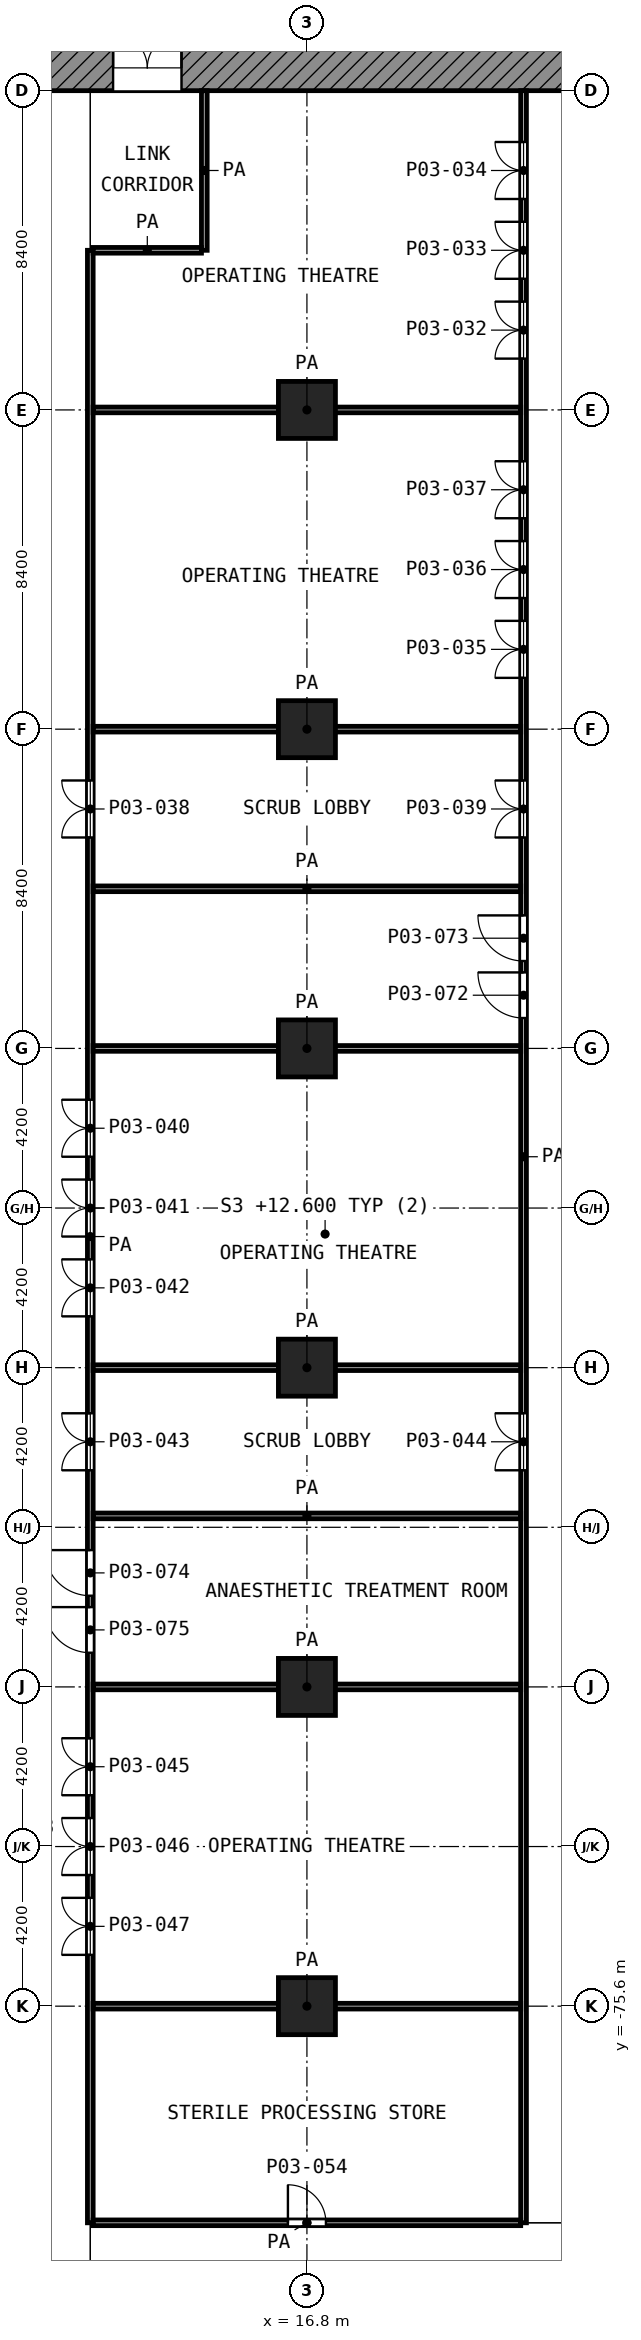
"""IFC4 building model, lengths in metres.
Left out: names, types, materials, properties, quantities, classifications, styles, units other than length and angle.
Written with IfcOpenShell. Run it as: python <this file> out.ifc"""

import sys

from ifc_helpers import new_model, si_unit, direction, frame, frame_2d, origin, origin_2d, place, context, subcontext, project, spatial, rectangle, extrude, element, fill, save


model = new_model("IFC4")
c1 = context("Model", 3, precision=1e-05, world=origin(), true_north=direction((0.0, 1.0)))
c2 = subcontext(c1, "Body", "Model", "MODEL_VIEW")
j1 = project(units=[si_unit("LENGTHUNIT", "METRE"), si_unit("PLANEANGLEUNIT", "RADIAN")], contexts=[c1])
p1 = place(None, origin())
s1 = spatial("IfcSite", under=j1, at=p1, CompositionType="ELEMENT")
p2 = place(p1, origin())
s2 = spatial("IfcBuilding", under=s1, at=p2, CompositionType="ELEMENT")
p3 = place(p2, frame((0.0, 0.0, 12.6)))
s3 = spatial("IfcBuildingStorey", under=s2, at=p3, CompositionType="ELEMENT", Elevation=12.6)
for number, where, z_axis, x_axis in (
    (1, (16.8, -33.6, 0.0), (0.0, 0.0, 1.0), (1.0, 0.0, 0.0)),
    (2, (16.8, -42.0, 0.0), (0.0, 0.0, 1.0), (1.0, 0.0, 0.0)),
    (3, (16.8, -50.4, 0.0), (0.0, 0.0, 1.0), (1.0, 0.0, 0.0)),
    (4, (16.8, -58.8, 0.0), (0.0, 0.0, 1.0), (1.0, 0.0, 0.0)),
    (5, (16.8, -67.2, 0.0), (0.0, 0.0, 1.0), (1.0, 0.0, 0.0)),
    (6, (16.8, -75.6, 0.0), (0.0, 0.0, 1.0), (1.0, 0.0, 0.0)),
):
    element("IfcColumn", number, at=place(p3, frame(where, z_axis=z_axis, x_axis=x_axis)), inside=s3, PredefinedType="COLUMN", context=c2, shape_type="SweptSolid", body=[
        extrude(rectangle(XDim=1.5, YDim=1.5, at=origin_2d()), origin(), (0.0, 0.0, 1.0), 5.6),
    ])
p4 = place(p3, frame((5.4, -24.6, 0.0), z_axis=(0.0, 0.0, 1.0), x_axis=(1.0, 0.0, 0.0)))
e7 = element("IfcWall", 7, at=p4, inside=s3, PredefinedType="SHEAR", context=c2, shape_type="SweptSolid", body=[
    extrude(rectangle(XDim=18.6, YDim=1.2, at=frame_2d((9.3, 0.0))), origin(), (0.0, 0.0, 1.0), 5.25),
])
p5 = place(p4, frame((6.3, 0.0, 0.0)))
e8 = element("IfcOpeningElement", 8, at=p5, cuts=e7, PredefinedType="OPENING", context=c2, shape_type="SweptSolid", body=[
    extrude(rectangle(XDim=1.8, YDim=2.1, at=frame_2d((0.9, 1.05))), frame((0.0, 0.61, 0.0), z_axis=(0.0, -1.0, 0.0), x_axis=(1.0, 0.0, 0.0)), (0.0, 0.0, 1.0), 1.22),
])
p6 = place(p3, frame((11.175, -81.3, 0.0), z_axis=(0.0, 0.0, 1.0), x_axis=(1.0, 0.0, 0.0)))
e9 = element("IfcWall", 9, at=p6, inside=s3, PredefinedType="PARTITIONING", context=c2, shape_type="SweptSolid", body=[
    extrude(rectangle(XDim=11.25, YDim=0.15, at=frame_2d((5.625, 0.0))), origin(), (0.0, 0.0, 1.0), 5.25),
])
p7 = place(p6, frame((5.125, 0.0, 0.0)))
e10 = element("IfcOpeningElement", 10, at=p7, cuts=e9, PredefinedType="OPENING", context=c2, shape_type="SweptSolid", body=[
    extrude(rectangle(XDim=1.0, YDim=2.1, at=frame_2d((0.5, 1.05))), frame((0.0, 0.085, 0.0), z_axis=(0.0, -1.0, 0.0), x_axis=(1.0, 0.0, 0.0)), (0.0, 0.0, 1.0), 0.17),
])
for number, where, z_axis, x_axis in (
    (11, (11.175, -75.6, 0.0), (0.0, 0.0, 1.0), (1.0, 0.0, 0.0)),
    (12, (11.175, -67.2, 0.0), (0.0, 0.0, 1.0), (1.0, 0.0, 0.0)),
    (13, (11.175, -62.7, 0.0), (0.0, 0.0, 1.0), (1.0, 0.0, 0.0)),
    (14, (11.175, -58.8, 0.0), (0.0, 0.0, 1.0), (1.0, 0.0, 0.0)),
    (15, (11.175, -50.4, 0.0), (0.0, 0.0, 1.0), (1.0, 0.0, 0.0)),
    (16, (11.175, -46.2, 0.0), (0.0, 0.0, 1.0), (1.0, 0.0, 0.0)),
    (17, (11.175, -42.0, 0.0), (0.0, 0.0, 1.0), (1.0, 0.0, 0.0)),
    (18, (11.175, -33.6, 0.0), (0.0, 0.0, 1.0), (1.0, 0.0, 0.0)),
):
    element("IfcWall", number, at=place(p3, frame(where, z_axis=z_axis, x_axis=x_axis)), inside=s3, PredefinedType="PARTITIONING", context=c2, shape_type="SweptSolid", body=[
        extrude(rectangle(XDim=11.25, YDim=0.15, at=frame_2d((5.625, 0.0))), origin(), (0.0, 0.0, 1.0), 5.25),
    ])
p8 = place(p3, frame((11.175, -29.4, 0.0), z_axis=(0.0, 0.0, 1.0), x_axis=(1.0, 0.0, 0.0)))
e19 = element("IfcWall", 19, at=p8, inside=s3, PredefinedType="PARTITIONING", context=c2, shape_type="SweptSolid", body=[
    extrude(rectangle(XDim=2.85, YDim=0.15, at=frame_2d((1.425, 0.0))), origin(), (0.0, 0.0, 1.0), 5.25),
])
p9 = place(p3, frame((11.1, -81.3, 0.0), z_axis=(0.0, 0.0, 1.0), x_axis=(0.0, 1.0, 0.0)))
e20 = element("IfcWall", 20, at=p9, inside=s3, PredefinedType="PARTITIONING", context=c2, shape_type="SweptSolid", body=[
    extrude(rectangle(XDim=51.9, YDim=0.15, at=frame_2d((25.95, 0.0))), origin(), (0.0, 0.0, 1.0), 5.25),
])
p10 = place(p9, frame((36.45, 0.0, 0.0)))
e21 = element("IfcOpeningElement", 21, at=p10, cuts=e20, PredefinedType="OPENING", context=c2, shape_type="SweptSolid", body=[
    extrude(rectangle(XDim=1.5, YDim=2.1, at=frame_2d((0.75, 1.05))), frame((0.0, 0.085, 0.0), z_axis=(0.0, -1.0, 0.0), x_axis=(1.0, 0.0, 0.0)), (0.0, 0.0, 1.0), 0.17),
])
p11 = place(p9, frame((28.05, 0.0, 0.0)))
e22 = element("IfcOpeningElement", 22, at=p11, cuts=e20, PredefinedType="OPENING", context=c2, shape_type="SweptSolid", body=[
    extrude(rectangle(XDim=1.5, YDim=2.1, at=frame_2d((0.75, 1.05))), frame((0.0, 0.085, 0.0), z_axis=(0.0, -1.0, 0.0), x_axis=(1.0, 0.0, 0.0)), (0.0, 0.0, 1.0), 0.17),
])
p12 = place(p9, frame((25.95, 0.0, 0.0)))
e23 = element("IfcOpeningElement", 23, at=p12, cuts=e20, PredefinedType="OPENING", context=c2, shape_type="SweptSolid", body=[
    extrude(rectangle(XDim=1.5, YDim=2.1, at=frame_2d((0.75, 1.05))), frame((0.0, 0.085, 0.0), z_axis=(0.0, -1.0, 0.0), x_axis=(1.0, 0.0, 0.0)), (0.0, 0.0, 1.0), 0.17),
])
p13 = place(p9, frame((23.85, 0.0, 0.0)))
e24 = element("IfcOpeningElement", 24, at=p13, cuts=e20, PredefinedType="OPENING", context=c2, shape_type="SweptSolid", body=[
    extrude(rectangle(XDim=1.5, YDim=2.1, at=frame_2d((0.75, 1.05))), frame((0.0, 0.085, 0.0), z_axis=(0.0, -1.0, 0.0), x_axis=(1.0, 0.0, 0.0)), (0.0, 0.0, 1.0), 0.17),
])
p14 = place(p9, frame((19.8, 0.0, 0.0)))
e25 = element("IfcOpeningElement", 25, at=p14, cuts=e20, PredefinedType="OPENING", context=c2, shape_type="SweptSolid", body=[
    extrude(rectangle(XDim=1.5, YDim=2.1, at=frame_2d((0.75, 1.05))), frame((0.0, 0.085, 0.0), z_axis=(0.0, -1.0, 0.0), x_axis=(1.0, 0.0, 0.0)), (0.0, 0.0, 1.0), 0.17),
])
p15 = place(p9, frame((16.5, 0.0, 0.0)))
e26 = element("IfcOpeningElement", 26, at=p15, cuts=e20, PredefinedType="OPENING", context=c2, shape_type="SweptSolid", body=[
    extrude(rectangle(XDim=1.2, YDim=2.1, at=frame_2d((0.6, 1.05))), frame((0.0, 0.085, 0.0), z_axis=(0.0, -1.0, 0.0), x_axis=(1.0, 0.0, 0.0)), (0.0, 0.0, 1.0), 0.17),
])
p16 = place(p9, frame((15.0, 0.0, 0.0)))
e27 = element("IfcOpeningElement", 27, at=p16, cuts=e20, PredefinedType="OPENING", context=c2, shape_type="SweptSolid", body=[
    extrude(rectangle(XDim=1.2, YDim=2.1, at=frame_2d((0.6, 1.05))), frame((0.0, 0.085, 0.0), z_axis=(0.0, -1.0, 0.0), x_axis=(1.0, 0.0, 0.0)), (0.0, 0.0, 1.0), 0.17),
])
p17 = place(p9, frame((11.25, 0.0, 0.0)))
e28 = element("IfcOpeningElement", 28, at=p17, cuts=e20, PredefinedType="OPENING", context=c2, shape_type="SweptSolid", body=[
    extrude(rectangle(XDim=1.5, YDim=2.1, at=frame_2d((0.75, 1.05))), frame((0.0, 0.085, 0.0), z_axis=(0.0, -1.0, 0.0), x_axis=(1.0, 0.0, 0.0)), (0.0, 0.0, 1.0), 0.17),
])
p18 = place(p9, frame((9.15, 0.0, 0.0)))
e29 = element("IfcOpeningElement", 29, at=p18, cuts=e20, PredefinedType="OPENING", context=c2, shape_type="SweptSolid", body=[
    extrude(rectangle(XDim=1.5, YDim=2.1, at=frame_2d((0.75, 1.05))), frame((0.0, 0.085, 0.0), z_axis=(0.0, -1.0, 0.0), x_axis=(1.0, 0.0, 0.0)), (0.0, 0.0, 1.0), 0.17),
])
p19 = place(p9, frame((7.05, 0.0, 0.0)))
e30 = element("IfcOpeningElement", 30, at=p19, cuts=e20, PredefinedType="OPENING", context=c2, shape_type="SweptSolid", body=[
    extrude(rectangle(XDim=1.5, YDim=2.1, at=frame_2d((0.75, 1.05))), frame((0.0, 0.085, 0.0), z_axis=(0.0, -1.0, 0.0), x_axis=(1.0, 0.0, 0.0)), (0.0, 0.0, 1.0), 0.17),
])
p20 = place(p3, frame((14.1, -29.4, 0.0), z_axis=(0.0, 0.0, 1.0), x_axis=(0.0, 1.0, 0.0)))
e31 = element("IfcWall", 31, at=p20, inside=s3, PredefinedType="PARTITIONING", context=c2, shape_type="SweptSolid", body=[
    extrude(rectangle(XDim=4.2, YDim=0.15, at=frame_2d((2.1, 0.0))), origin(), (0.0, 0.0, 1.0), 5.25),
])
p21 = place(p3, frame((22.5, -81.3, 0.0), z_axis=(0.0, 0.0, 1.0), x_axis=(0.0, 1.0, 0.0)))
e32 = element("IfcWall", 32, at=p21, inside=s3, PredefinedType="PARTITIONING", context=c2, shape_type="SweptSolid", body=[
    extrude(rectangle(XDim=56.1, YDim=0.15, at=frame_2d((28.05, 0.0))), origin(), (0.0, 0.0, 1.0), 5.25),
])
p22 = place(p21, frame((49.05, 0.0, 0.0)))
e33 = element("IfcOpeningElement", 33, at=p22, cuts=e32, PredefinedType="OPENING", context=c2, shape_type="SweptSolid", body=[
    extrude(rectangle(XDim=1.5, YDim=2.1, at=frame_2d((0.75, 1.05))), frame((0.0, 0.085, 0.0), z_axis=(0.0, -1.0, 0.0), x_axis=(1.0, 0.0, 0.0)), (0.0, 0.0, 1.0), 0.17),
])
p23 = place(p21, frame((51.15, 0.0, 0.0)))
e34 = element("IfcOpeningElement", 34, at=p23, cuts=e32, PredefinedType="OPENING", context=c2, shape_type="SweptSolid", body=[
    extrude(rectangle(XDim=1.5, YDim=2.1, at=frame_2d((0.75, 1.05))), frame((0.0, 0.085, 0.0), z_axis=(0.0, -1.0, 0.0), x_axis=(1.0, 0.0, 0.0)), (0.0, 0.0, 1.0), 0.17),
])
p24 = place(p21, frame((53.25, 0.0, 0.0)))
e35 = element("IfcOpeningElement", 35, at=p24, cuts=e32, PredefinedType="OPENING", context=c2, shape_type="SweptSolid", body=[
    extrude(rectangle(XDim=1.5, YDim=2.1, at=frame_2d((0.75, 1.05))), frame((0.0, 0.085, 0.0), z_axis=(0.0, -1.0, 0.0), x_axis=(1.0, 0.0, 0.0)), (0.0, 0.0, 1.0), 0.17),
])
p25 = place(p21, frame((40.65, 0.0, 0.0)))
e36 = element("IfcOpeningElement", 36, at=p25, cuts=e32, PredefinedType="OPENING", context=c2, shape_type="SweptSolid", body=[
    extrude(rectangle(XDim=1.5, YDim=2.1, at=frame_2d((0.75, 1.05))), frame((0.0, 0.085, 0.0), z_axis=(0.0, -1.0, 0.0), x_axis=(1.0, 0.0, 0.0)), (0.0, 0.0, 1.0), 0.17),
])
p26 = place(p21, frame((42.75, 0.0, 0.0)))
e37 = element("IfcOpeningElement", 37, at=p26, cuts=e32, PredefinedType="OPENING", context=c2, shape_type="SweptSolid", body=[
    extrude(rectangle(XDim=1.5, YDim=2.1, at=frame_2d((0.75, 1.05))), frame((0.0, 0.085, 0.0), z_axis=(0.0, -1.0, 0.0), x_axis=(1.0, 0.0, 0.0)), (0.0, 0.0, 1.0), 0.17),
])
p27 = place(p21, frame((44.85, 0.0, 0.0)))
e38 = element("IfcOpeningElement", 38, at=p27, cuts=e32, PredefinedType="OPENING", context=c2, shape_type="SweptSolid", body=[
    extrude(rectangle(XDim=1.5, YDim=2.1, at=frame_2d((0.75, 1.05))), frame((0.0, 0.085, 0.0), z_axis=(0.0, -1.0, 0.0), x_axis=(1.0, 0.0, 0.0)), (0.0, 0.0, 1.0), 0.17),
])
p28 = place(p21, frame((36.45, 0.0, 0.0)))
e39 = element("IfcOpeningElement", 39, at=p28, cuts=e32, PredefinedType="OPENING", context=c2, shape_type="SweptSolid", body=[
    extrude(rectangle(XDim=1.5, YDim=2.1, at=frame_2d((0.75, 1.05))), frame((0.0, 0.085, 0.0), z_axis=(0.0, -1.0, 0.0), x_axis=(1.0, 0.0, 0.0)), (0.0, 0.0, 1.0), 0.17),
])
p29 = place(p21, frame((31.7, 0.0, 0.0)))
e40 = element("IfcOpeningElement", 40, at=p29, cuts=e32, PredefinedType="OPENING", context=c2, shape_type="SweptSolid", body=[
    extrude(rectangle(XDim=1.2, YDim=2.1, at=frame_2d((0.6, 1.05))), frame((0.0, 0.085, 0.0), z_axis=(0.0, -1.0, 0.0), x_axis=(1.0, 0.0, 0.0)), (0.0, 0.0, 1.0), 0.17),
])
p30 = place(p21, frame((33.2, 0.0, 0.0)))
e41 = element("IfcOpeningElement", 41, at=p30, cuts=e32, PredefinedType="OPENING", context=c2, shape_type="SweptSolid", body=[
    extrude(rectangle(XDim=1.2, YDim=2.1, at=frame_2d((0.6, 1.05))), frame((0.0, 0.085, 0.0), z_axis=(0.0, -1.0, 0.0), x_axis=(1.0, 0.0, 0.0)), (0.0, 0.0, 1.0), 0.17),
])
p31 = place(p21, frame((19.8, 0.0, 0.0)))
e42 = element("IfcOpeningElement", 42, at=p31, cuts=e32, PredefinedType="OPENING", context=c2, shape_type="SweptSolid", body=[
    extrude(rectangle(XDim=1.5, YDim=2.1, at=frame_2d((0.75, 1.05))), frame((0.0, 0.085, 0.0), z_axis=(0.0, -1.0, 0.0), x_axis=(1.0, 0.0, 0.0)), (0.0, 0.0, 1.0), 0.17),
])
p32 = place(p5, origin())
e43 = element("IfcDoor", 43, at=p32, inside=s3, OperationType="DOUBLE_DOOR_SINGLE_SWING", PredefinedType="DOOR", context=c2, shape_type="SweptSolid", body=[
    extrude(rectangle(XDim=1.8, YDim=2.1, at=frame_2d((0.9, 1.05))), frame((0.0, 0.025, 0.0), z_axis=(0.0, -1.0, 0.0), x_axis=(1.0, 0.0, 0.0)), (0.0, 0.0, 1.0), 0.05),
])
fill(e8, e43)
p33 = place(p22, origin())
e44 = element("IfcDoor", 44, at=p33, inside=s3, OperationType="DOUBLE_DOOR_SINGLE_SWING", PredefinedType="DOOR", context=c2, shape_type="SweptSolid", body=[
    extrude(rectangle(XDim=1.5, YDim=2.1, at=frame_2d((0.75, 1.05))), frame((0.0, 0.025, 0.0), z_axis=(0.0, -1.0, 0.0), x_axis=(1.0, 0.0, 0.0)), (0.0, 0.0, 1.0), 0.05),
])
fill(e33, e44)
p34 = place(p23, origin())
e45 = element("IfcDoor", 45, at=p34, inside=s3, OperationType="DOUBLE_DOOR_SINGLE_SWING", PredefinedType="DOOR", context=c2, shape_type="SweptSolid", body=[
    extrude(rectangle(XDim=1.5, YDim=2.1, at=frame_2d((0.75, 1.05))), frame((0.0, 0.025, 0.0), z_axis=(0.0, -1.0, 0.0), x_axis=(1.0, 0.0, 0.0)), (0.0, 0.0, 1.0), 0.05),
])
fill(e34, e45)
p35 = place(p24, origin())
e46 = element("IfcDoor", 46, at=p35, inside=s3, OperationType="DOUBLE_DOOR_SINGLE_SWING", PredefinedType="DOOR", context=c2, shape_type="SweptSolid", body=[
    extrude(rectangle(XDim=1.5, YDim=2.1, at=frame_2d((0.75, 1.05))), frame((0.0, 0.025, 0.0), z_axis=(0.0, -1.0, 0.0), x_axis=(1.0, 0.0, 0.0)), (0.0, 0.0, 1.0), 0.05),
])
fill(e35, e46)
p36 = place(p25, origin())
e47 = element("IfcDoor", 47, at=p36, inside=s3, OperationType="DOUBLE_DOOR_SINGLE_SWING", PredefinedType="DOOR", context=c2, shape_type="SweptSolid", body=[
    extrude(rectangle(XDim=1.5, YDim=2.1, at=frame_2d((0.75, 1.05))), frame((0.0, 0.025, 0.0), z_axis=(0.0, -1.0, 0.0), x_axis=(1.0, 0.0, 0.0)), (0.0, 0.0, 1.0), 0.05),
])
fill(e36, e47)
p37 = place(p26, origin())
e48 = element("IfcDoor", 48, at=p37, inside=s3, OperationType="DOUBLE_DOOR_SINGLE_SWING", PredefinedType="DOOR", context=c2, shape_type="SweptSolid", body=[
    extrude(rectangle(XDim=1.5, YDim=2.1, at=frame_2d((0.75, 1.05))), frame((0.0, 0.025, 0.0), z_axis=(0.0, -1.0, 0.0), x_axis=(1.0, 0.0, 0.0)), (0.0, 0.0, 1.0), 0.05),
])
fill(e37, e48)
p38 = place(p27, origin())
e49 = element("IfcDoor", 49, at=p38, inside=s3, OperationType="DOUBLE_DOOR_SINGLE_SWING", PredefinedType="DOOR", context=c2, shape_type="SweptSolid", body=[
    extrude(rectangle(XDim=1.5, YDim=2.1, at=frame_2d((0.75, 1.05))), frame((0.0, 0.025, 0.0), z_axis=(0.0, -1.0, 0.0), x_axis=(1.0, 0.0, 0.0)), (0.0, 0.0, 1.0), 0.05),
])
fill(e38, e49)
p39 = place(p10, origin())
e50 = element("IfcDoor", 50, at=p39, inside=s3, OperationType="DOUBLE_DOOR_SINGLE_SWING", PredefinedType="DOOR", context=c2, shape_type="SweptSolid", body=[
    extrude(rectangle(XDim=1.5, YDim=2.1, at=frame_2d((0.75, 1.05))), frame((0.0, 0.025, 0.0), z_axis=(0.0, -1.0, 0.0), x_axis=(1.0, 0.0, 0.0)), (0.0, 0.0, 1.0), 0.05),
])
fill(e21, e50)
p40 = place(p28, origin())
e51 = element("IfcDoor", 51, at=p40, inside=s3, OperationType="DOUBLE_DOOR_SINGLE_SWING", PredefinedType="DOOR", context=c2, shape_type="SweptSolid", body=[
    extrude(rectangle(XDim=1.5, YDim=2.1, at=frame_2d((0.75, 1.05))), frame((0.0, 0.025, 0.0), z_axis=(0.0, -1.0, 0.0), x_axis=(1.0, 0.0, 0.0)), (0.0, 0.0, 1.0), 0.05),
])
fill(e39, e51)
p41 = place(p29, origin())
e52 = element("IfcDoor", 52, at=p41, inside=s3, OperationType="SINGLE_SWING_RIGHT", PredefinedType="DOOR", context=c2, shape_type="SweptSolid", body=[
    extrude(rectangle(XDim=1.2, YDim=2.1, at=frame_2d((0.6, 1.05))), frame((0.0, 0.025, 0.0), z_axis=(0.0, -1.0, 0.0), x_axis=(1.0, 0.0, 0.0)), (0.0, 0.0, 1.0), 0.05),
])
fill(e40, e52)
p42 = place(p30, origin())
e53 = element("IfcDoor", 53, at=p42, inside=s3, OperationType="SINGLE_SWING_RIGHT", PredefinedType="DOOR", context=c2, shape_type="SweptSolid", body=[
    extrude(rectangle(XDim=1.2, YDim=2.1, at=frame_2d((0.6, 1.05))), frame((0.0, 0.025, 0.0), z_axis=(0.0, -1.0, 0.0), x_axis=(1.0, 0.0, 0.0)), (0.0, 0.0, 1.0), 0.05),
])
fill(e41, e53)
p43 = place(p11, origin())
e54 = element("IfcDoor", 54, at=p43, inside=s3, OperationType="DOUBLE_DOOR_SINGLE_SWING", PredefinedType="DOOR", context=c2, shape_type="SweptSolid", body=[
    extrude(rectangle(XDim=1.5, YDim=2.1, at=frame_2d((0.75, 1.05))), frame((0.0, 0.025, 0.0), z_axis=(0.0, -1.0, 0.0), x_axis=(1.0, 0.0, 0.0)), (0.0, 0.0, 1.0), 0.05),
])
fill(e22, e54)
p44 = place(p12, origin())
e55 = element("IfcDoor", 55, at=p44, inside=s3, OperationType="DOUBLE_DOOR_SINGLE_SWING", PredefinedType="DOOR", context=c2, shape_type="SweptSolid", body=[
    extrude(rectangle(XDim=1.5, YDim=2.1, at=frame_2d((0.75, 1.05))), frame((0.0, 0.025, 0.0), z_axis=(0.0, -1.0, 0.0), x_axis=(1.0, 0.0, 0.0)), (0.0, 0.0, 1.0), 0.05),
])
fill(e23, e55)
p45 = place(p13, origin())
e56 = element("IfcDoor", 56, at=p45, inside=s3, OperationType="DOUBLE_DOOR_SINGLE_SWING", PredefinedType="DOOR", context=c2, shape_type="SweptSolid", body=[
    extrude(rectangle(XDim=1.5, YDim=2.1, at=frame_2d((0.75, 1.05))), frame((0.0, 0.025, 0.0), z_axis=(0.0, -1.0, 0.0), x_axis=(1.0, 0.0, 0.0)), (0.0, 0.0, 1.0), 0.05),
])
fill(e24, e56)
p46 = place(p14, origin())
e57 = element("IfcDoor", 57, at=p46, inside=s3, OperationType="DOUBLE_DOOR_SINGLE_SWING", PredefinedType="DOOR", context=c2, shape_type="SweptSolid", body=[
    extrude(rectangle(XDim=1.5, YDim=2.1, at=frame_2d((0.75, 1.05))), frame((0.0, 0.025, 0.0), z_axis=(0.0, -1.0, 0.0), x_axis=(1.0, 0.0, 0.0)), (0.0, 0.0, 1.0), 0.05),
])
fill(e25, e57)
p47 = place(p31, origin())
e58 = element("IfcDoor", 58, at=p47, inside=s3, OperationType="DOUBLE_DOOR_SINGLE_SWING", PredefinedType="DOOR", context=c2, shape_type="SweptSolid", body=[
    extrude(rectangle(XDim=1.5, YDim=2.1, at=frame_2d((0.75, 1.05))), frame((0.0, 0.025, 0.0), z_axis=(0.0, -1.0, 0.0), x_axis=(1.0, 0.0, 0.0)), (0.0, 0.0, 1.0), 0.05),
])
fill(e42, e58)
p48 = place(p15, origin())
e59 = element("IfcDoor", 59, at=p48, inside=s3, OperationType="SINGLE_SWING_RIGHT", PredefinedType="DOOR", context=c2, shape_type="SweptSolid", body=[
    extrude(rectangle(XDim=1.2, YDim=2.1, at=frame_2d((0.6, 1.05))), frame((0.0, 0.025, 0.0), z_axis=(0.0, -1.0, 0.0), x_axis=(1.0, 0.0, 0.0)), (0.0, 0.0, 1.0), 0.05),
])
fill(e26, e59)
p49 = place(p16, origin())
e60 = element("IfcDoor", 60, at=p49, inside=s3, OperationType="SINGLE_SWING_RIGHT", PredefinedType="DOOR", context=c2, shape_type="SweptSolid", body=[
    extrude(rectangle(XDim=1.2, YDim=2.1, at=frame_2d((0.6, 1.05))), frame((0.0, 0.025, 0.0), z_axis=(0.0, -1.0, 0.0), x_axis=(1.0, 0.0, 0.0)), (0.0, 0.0, 1.0), 0.05),
])
fill(e27, e60)
p50 = place(p17, origin())
e61 = element("IfcDoor", 61, at=p50, inside=s3, OperationType="DOUBLE_DOOR_SINGLE_SWING", PredefinedType="DOOR", context=c2, shape_type="SweptSolid", body=[
    extrude(rectangle(XDim=1.5, YDim=2.1, at=frame_2d((0.75, 1.05))), frame((0.0, 0.025, 0.0), z_axis=(0.0, -1.0, 0.0), x_axis=(1.0, 0.0, 0.0)), (0.0, 0.0, 1.0), 0.05),
])
fill(e28, e61)
p51 = place(p18, origin())
e62 = element("IfcDoor", 62, at=p51, inside=s3, OperationType="DOUBLE_DOOR_SINGLE_SWING", PredefinedType="DOOR", context=c2, shape_type="SweptSolid", body=[
    extrude(rectangle(XDim=1.5, YDim=2.1, at=frame_2d((0.75, 1.05))), frame((0.0, 0.025, 0.0), z_axis=(0.0, -1.0, 0.0), x_axis=(1.0, 0.0, 0.0)), (0.0, 0.0, 1.0), 0.05),
])
fill(e29, e62)
p52 = place(p19, origin())
e63 = element("IfcDoor", 63, at=p52, inside=s3, OperationType="DOUBLE_DOOR_SINGLE_SWING", PredefinedType="DOOR", context=c2, shape_type="SweptSolid", body=[
    extrude(rectangle(XDim=1.5, YDim=2.1, at=frame_2d((0.75, 1.05))), frame((0.0, 0.025, 0.0), z_axis=(0.0, -1.0, 0.0), x_axis=(1.0, 0.0, 0.0)), (0.0, 0.0, 1.0), 0.05),
])
fill(e30, e63)
p53 = place(p7, origin())
e64 = element("IfcDoor", 64, at=p53, inside=s3, OperationType="SINGLE_SWING_LEFT", PredefinedType="DOOR", context=c2, shape_type="SweptSolid", body=[
    extrude(rectangle(XDim=1.0, YDim=2.1, at=frame_2d((0.5, 1.05))), frame((0.0, 0.025, 0.0), z_axis=(0.0, -1.0, 0.0), x_axis=(1.0, 0.0, 0.0)), (0.0, 0.0, 1.0), 0.05),
])
fill(e10, e64)
save(model, sys.argv[1])
